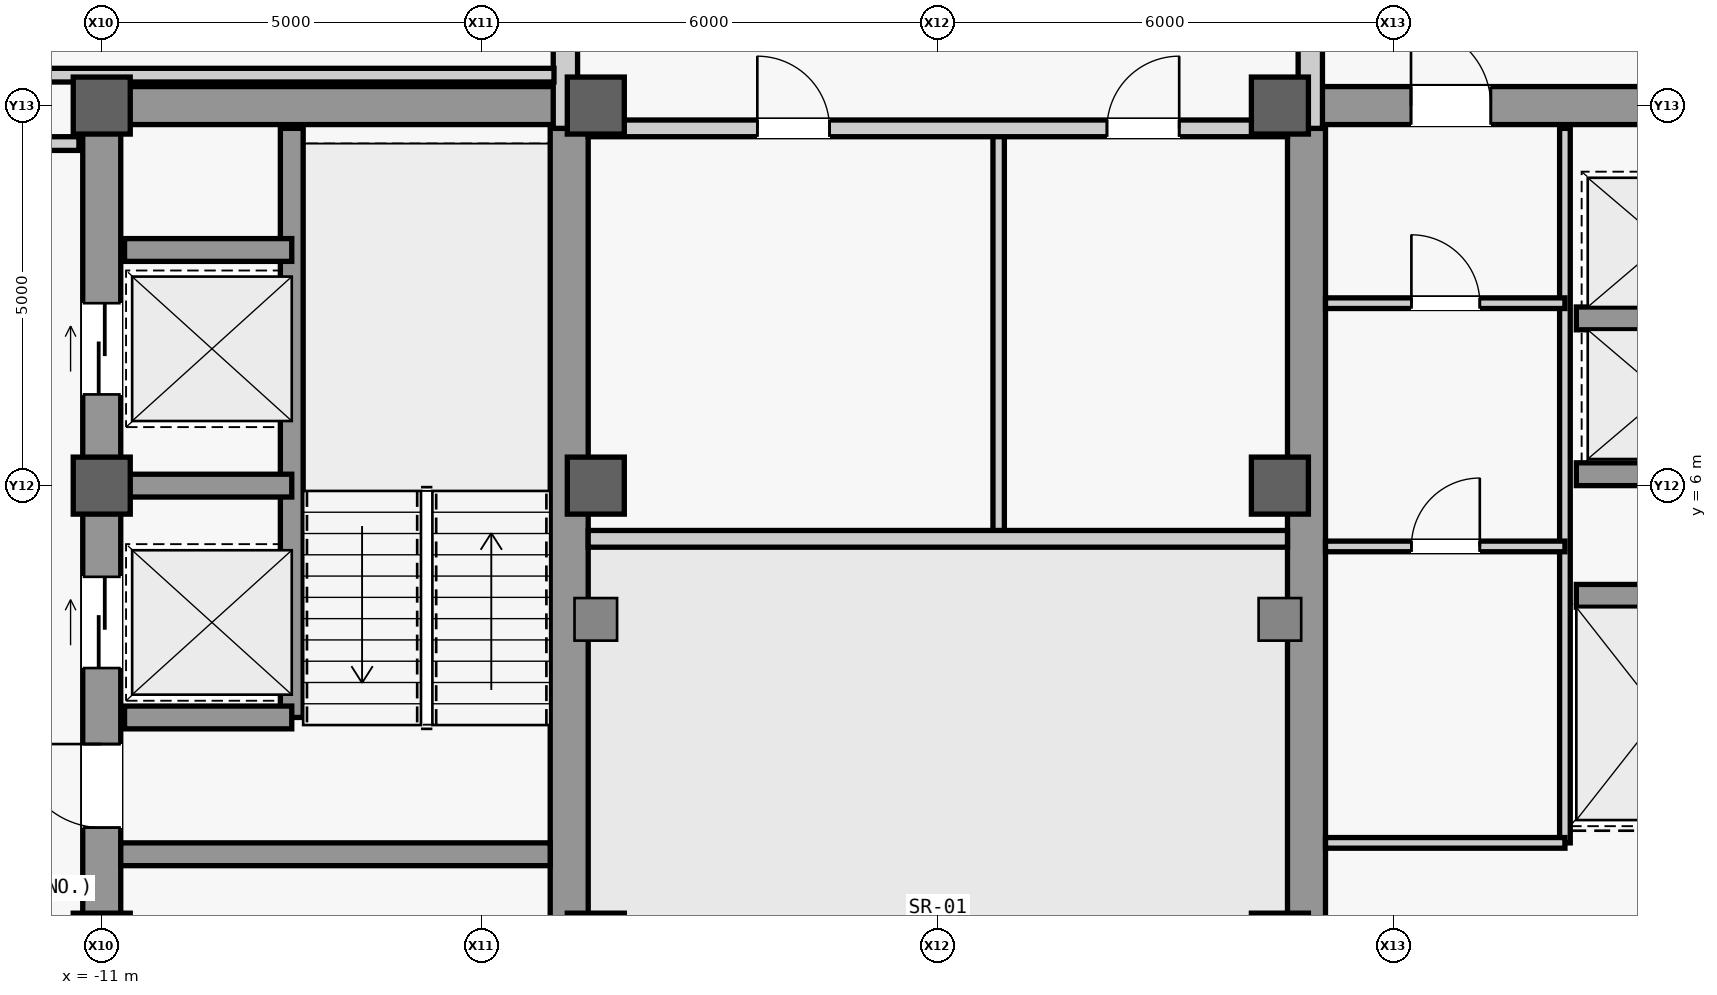
"""IFC4 building model, lengths in metres.
Left out: names, types, materials, properties, quantities, classifications, styles, units other than length and angle.
Written with IfcOpenShell. Run it as: python <this file> out.ifc"""

import sys

from ifc_helpers import new_model, si_unit, direction, frame, frame_2d, origin, origin_2d, place, context, subcontext, project, spatial, rectangle, extrude, source, transform, mapped, element, fill, save


model = new_model("IFC4")
c1 = context("Model", 3, precision=1e-05, world=origin(), true_north=direction((0.0, 1.0)))
c2 = subcontext(c1, "Body", "Model", "MODEL_VIEW")
j1 = project(units=[si_unit("LENGTHUNIT", "METRE"), si_unit("PLANEANGLEUNIT", "RADIAN")], contexts=[c1])
p1 = place(None, origin())
s1 = spatial("IfcSite", under=j1, at=p1, CompositionType="ELEMENT")
p2 = place(p1, origin())
s2 = spatial("IfcBuilding", under=s1, at=p2, CompositionType="ELEMENT")
p3 = place(p2, frame((0.0, 0.0, 346.3)))
s3 = spatial("IfcBuildingStorey", under=s2, at=p3, CompositionType="ELEMENT", Elevation=346.3)
m1 = source(origin(), c2, "Body", "SweptSolid", [
    extrude(rectangle(XDim=22.0, YDim=0.5, at=frame_2d((11.0, 0.0))), origin(), (0.0, 0.0, 1.0), 3.74),
])
p4 = place(p3, frame((-11.0, -11.0, 0.0), z_axis=(0.0, 0.0, 1.0), x_axis=(0.0, 1.0, 0.0)))
e1 = element("IfcWall", 1, at=p4, inside=s3, PredefinedType="SHEAR", context=c2, shape_type="MappedRepresentation", body=[
    mapped(m1, transform((0.0, 0.0, 0.0), scale=1.0)),
])
m2 = source(origin(), c2, "Body", "SweptSolid", [
    extrude(rectangle(XDim=1.1, YDim=2.2, at=frame_2d((0.55, 1.1))), frame((0.0, 0.26, 0.0), z_axis=(0.0, -1.0, 0.0), x_axis=(1.0, 0.0, 0.0)), (0.0, 0.0, 1.0), 0.52),
])
p5 = place(p4, frame((0.8, 0.0, 0.0)))
e2 = element("IfcOpeningElement", 2, at=p5, cuts=e1, PredefinedType="OPENING", context=c2, shape_type="MappedRepresentation", body=[
    mapped(m2, transform((0.0, 0.0, 0.0), scale=1.0)),
])
p6 = place(p4, frame((12.5, 0.0, 0.0)))
e3 = element("IfcOpeningElement", 3, at=p6, cuts=e1, PredefinedType="OPENING", context=c2, shape_type="MappedRepresentation", body=[
    mapped(m2, transform((0.0, 0.0, 0.0), scale=1.0)),
])
m3 = source(origin(), c2, "Body", "SweptSolid", [
    extrude(rectangle(XDim=0.9, YDim=2.15, at=frame_2d((0.45, 1.075))), frame((0.0, 0.26, 0.0), z_axis=(0.0, -1.0, 0.0), x_axis=(1.0, 0.0, 0.0)), (0.0, 0.0, 1.0), 0.52),
])
p7 = place(p4, frame((6.85, 0.0, 0.0)))
e4 = element("IfcOpeningElement", 4, at=p7, cuts=e1, PredefinedType="OPENING", context=c2, shape_type="MappedRepresentation", body=[
    mapped(m3, transform((0.0, 0.0, 0.0), scale=1.0)),
])
m4 = source(origin(), c2, "Body", "SweptSolid", [
    extrude(rectangle(XDim=1.2, YDim=2.3, at=frame_2d((0.6, 1.15))), frame((0.0, 0.26, 0.0), z_axis=(0.0, -1.0, 0.0), x_axis=(1.0, 0.0, 0.0)), (0.0, 0.0, 1.0), 0.52),
])
p8 = place(p4, frame((14.6, 0.0, 0.0)))
e5 = element("IfcOpeningElement", 5, at=p8, cuts=e1, PredefinedType="OPENING", context=c2, shape_type="MappedRepresentation", body=[
    mapped(m4, transform((0.0, 0.0, 0.0), scale=1.0)),
])
p9 = place(p4, frame((18.2, 0.0, 0.0)))
e6 = element("IfcOpeningElement", 6, at=p9, cuts=e1, PredefinedType="OPENING", context=c2, shape_type="MappedRepresentation", body=[
    mapped(m4, transform((0.0, 0.0, 0.0), scale=1.0)),
])
m5 = source(origin(), c2, "Body", "SweptSolid", [
    extrude(rectangle(XDim=1.3, YDim=2.3, at=frame_2d((0.65, 1.15))), frame((0.0, 0.26, 0.0), z_axis=(0.0, -1.0, 0.0), x_axis=(1.0, 0.0, 0.0)), (0.0, 0.0, 1.0), 0.52),
])
p10 = place(p4, frame((2.7, 0.0, 0.0)))
e7 = element("IfcOpeningElement", 7, at=p10, cuts=e1, PredefinedType="OPENING", context=c2, shape_type="MappedRepresentation", body=[
    mapped(m5, transform((0.0, 0.0, 0.0), scale=1.0)),
])
m6 = source(origin(), c2, "Body", "SweptSolid", [
    extrude(rectangle(XDim=21.4, YDim=0.5, at=frame_2d((10.7, 0.0))), origin(), (0.0, 0.0, 1.0), 3.74),
])
for number, where, z_axis, x_axis in (
    (8, (-4.85, -10.7, 0.0), (0.0, 0.0, 1.0), (0.0, 1.0, 0.0)),
    (9, (4.85, -10.7, 0.0), (0.0, 0.0, 1.0), (0.0, 1.0, 0.0)),
):
    element("IfcWall", number, at=place(p3, frame(where, z_axis=z_axis, x_axis=x_axis)), inside=s3, PredefinedType="SHEAR", context=c2, shape_type="MappedRepresentation", body=[
        mapped(m6, transform((0.0, 0.0, 0.0), scale=1.0)),
    ])
m7 = source(origin(), c2, "Body", "SweptSolid", [
    extrude(rectangle(XDim=5.9, YDim=0.5, at=frame_2d((2.95, 0.0))), origin(), (0.0, 0.0, 1.0), 3.74),
])
p11 = place(p3, frame((-10.75, 11.0, 0.0), z_axis=(0.0, 0.0, 1.0), x_axis=(1.0, 0.0, 0.0)))
e10 = element("IfcWall", 10, at=p11, inside=s3, PredefinedType="SHEAR", context=c2, shape_type="MappedRepresentation", body=[
    mapped(m7, transform((0.0, 0.0, 0.0), scale=1.0)),
])
p12 = place(p3, frame((4.85, 11.0, 0.0), z_axis=(0.0, 0.0, 1.0), x_axis=(1.0, 0.0, 0.0)))
e11 = element("IfcWall", 11, at=p12, inside=s3, PredefinedType="SHEAR", context=c2, shape_type="MappedRepresentation", body=[
    mapped(m7, transform((0.0, 0.0, 0.0), scale=1.0)),
])
m8 = source(origin(), c2, "Body", "SweptSolid", [
    extrude(rectangle(XDim=1.05, YDim=2.2, at=frame_2d((0.525, 1.1))), frame((0.0, 0.26, 0.0), z_axis=(0.0, -1.0, 0.0), x_axis=(1.0, 0.0, 0.0)), (0.0, 0.0, 1.0), 0.52),
])
p13 = place(p12, frame((1.375, 0.0, 0.0)))
e12 = element("IfcOpeningElement", 12, at=p13, cuts=e11, PredefinedType="OPENING", context=c2, shape_type="MappedRepresentation", body=[
    mapped(m8, transform((0.0, 0.0, 0.0), scale=1.0)),
])
m9 = source(origin(), c2, "Body", "SweptSolid", [
    extrude(rectangle(XDim=5.65, YDim=0.3, at=frame_2d((2.825, 0.0))), origin(), (0.0, 0.0, 1.0), 3.74),
])
p14 = place(p3, frame((-10.75, 1.15, 0.0), z_axis=(0.0, 0.0, 1.0), x_axis=(1.0, 0.0, 0.0)))
e13 = element("IfcWall", 13, at=p14, inside=s3, PredefinedType="SHEAR", context=c2, shape_type="MappedRepresentation", body=[
    mapped(m9, transform((0.0, 0.0, 0.0), scale=1.0)),
])
m10 = source(origin(), c2, "Body", "SweptSolid", [
    extrude(rectangle(XDim=0.75, YDim=0.75, at=origin_2d()), origin(), (0.0, 0.0, 1.0), 4.0),
])
for number, where, z_axis, x_axis in (
    (14, (-11.0, 0.0, 0.0), (0.0, 0.0, 1.0), (1.0, 0.0, 0.0)),
    (15, (-11.0, 6.0, 0.0), (0.0, 0.0, 1.0), (1.0, 0.0, 0.0)),
    (16, (-11.0, 11.0, 0.0), (0.0, 0.0, 1.0), (1.0, 0.0, 0.0)),
    (17, (-4.5, 0.0, 0.0), (0.0, 0.0, 1.0), (1.0, 0.0, 0.0)),
    (18, (-4.5, 6.0, 0.0), (0.0, 0.0, 1.0), (1.0, 0.0, 0.0)),
    (19, (-4.5, 11.0, 0.0), (0.0, 0.0, 1.0), (1.0, 0.0, 0.0)),
    (20, (4.5, 0.0, 0.0), (0.0, 0.0, 1.0), (1.0, 0.0, 0.0)),
    (21, (4.5, 6.0, 0.0), (0.0, 0.0, 1.0), (1.0, 0.0, 0.0)),
    (22, (4.5, 11.0, 0.0), (0.0, 0.0, 1.0), (1.0, 0.0, 0.0)),
):
    element("IfcColumn", number, at=place(p3, frame(where, z_axis=z_axis, x_axis=x_axis)), inside=s3, PredefinedType="COLUMN", context=c2, shape_type="MappedRepresentation", body=[
        mapped(m10, transform((0.0, 0.0, 0.0), scale=1.0)),
    ])
m11 = source(origin(), c2, "Body", "SweptSolid", [
    extrude(rectangle(XDim=14.98, YDim=0.32, at=frame_2d((7.49, 0.0))), origin(), (0.0, 0.0, 1.0), 3.045),
])
for number, where, z_axis, x_axis in (
    (23, (-4.9, 10.7, 0.0), (0.0, 0.0, 1.0), (0.0, 1.0, 0.0)),
    (24, (4.9, 10.7, 0.0), (0.0, 0.0, 1.0), (0.0, 1.0, 0.0)),
):
    element("IfcWall", number, at=place(p3, frame(where, z_axis=z_axis, x_axis=x_axis)), inside=s3, PredefinedType="STANDARD", context=c2, shape_type="MappedRepresentation", body=[
        mapped(m11, transform((0.0, 0.0, 0.0), scale=1.0)),
    ])
m12 = source(origin(), c2, "Body", "SweptSolid", [
    extrude(rectangle(XDim=7.75, YDim=0.3, at=frame_2d((3.875, 0.0))), origin(), (0.0, 0.0, 1.0), 3.74),
])
p15 = place(p3, frame((-8.5, 2.95, 0.0), z_axis=(0.0, 0.0, 1.0), x_axis=(0.0, 1.0, 0.0)))
e25 = element("IfcWall", 25, at=p15, inside=s3, PredefinedType="SHEAR", context=c2, shape_type="MappedRepresentation", body=[
    mapped(m12, transform((0.0, 0.0, 0.0), scale=1.0)),
])
m13 = source(origin(), c2, "Body", "SweptSolid", [
    extrude(rectangle(XDim=2.2, YDim=0.3, at=frame_2d((1.1, 0.0))), origin(), (0.0, 0.0, 1.0), 3.74),
])
for number, where, z_axis, x_axis in (
    (26, (-10.7, 2.95, 0.0), (0.0, 0.0, 1.0), (1.0, 0.0, 0.0)),
    (27, (-10.7, 6.0, 0.0), (0.0, 0.0, 1.0), (1.0, 0.0, 0.0)),
    (28, (-10.7, 9.1, 0.0), (0.0, 0.0, 1.0), (1.0, 0.0, 0.0)),
):
    element("IfcWall", number, at=place(p3, frame(where, z_axis=z_axis, x_axis=x_axis)), inside=s3, PredefinedType="SHEAR", context=c2, shape_type="MappedRepresentation", body=[
        mapped(m13, transform((0.0, 0.0, 0.0), scale=1.0)),
    ])
m14 = source(origin(), c2, "Body", "SweptSolid", [
    extrude(rectangle(XDim=2.3, YDim=0.3, at=frame_2d((1.15, 0.0))), origin(), (0.0, 0.0, 1.0), 3.74),
])
for number, where, z_axis, x_axis in (
    (29, (8.4, 4.55, 0.0), (0.0, 0.0, 1.0), (1.0, 0.0, 0.0)),
    (30, (8.4, 6.15, 0.0), (0.0, 0.0, 1.0), (1.0, 0.0, 0.0)),
    (31, (8.4, 8.2, 0.0), (0.0, 0.0, 1.0), (1.0, 0.0, 0.0)),
):
    element("IfcWall", number, at=place(p3, frame(where, z_axis=z_axis, x_axis=x_axis)), inside=s3, PredefinedType="SHEAR", context=c2, shape_type="MappedRepresentation", body=[
        mapped(m14, transform((0.0, 0.0, 0.0), scale=1.0)),
    ])
m15 = source(origin(), c2, "Body", "SweptSolid", [
    extrude(rectangle(XDim=9.4, YDim=0.14, at=frame_2d((4.7, 0.0))), origin(), (0.0, 0.0, 1.0), 3.74),
])
p16 = place(p3, frame((8.25, 1.3, 0.0), z_axis=(0.0, 0.0, 1.0), x_axis=(0.0, 1.0, 0.0)))
e32 = element("IfcWall", 32, at=p16, inside=s3, PredefinedType="PARTITIONING", context=c2, shape_type="MappedRepresentation", body=[
    mapped(m15, transform((0.0, 0.0, 0.0), scale=1.0)),
])
m16 = source(origin(), c2, "Body", "SweptSolid", [
    extrude(rectangle(XDim=3.15, YDim=0.14, at=frame_2d((1.575, 0.0))), origin(), (0.0, 0.0, 1.0), 3.74),
])
p17 = place(p3, frame((5.1, 1.3, 0.0), z_axis=(0.0, 0.0, 1.0), x_axis=(1.0, 0.0, 0.0)))
e33 = element("IfcWall", 33, at=p17, inside=s3, PredefinedType="PARTITIONING", context=c2, shape_type="MappedRepresentation", body=[
    mapped(m16, transform((0.0, 0.0, 0.0), scale=1.0)),
])
p18 = place(p3, frame((5.1, 8.4, 0.0), z_axis=(0.0, 0.0, 1.0), x_axis=(1.0, 0.0, 0.0)))
e34 = element("IfcWall", 34, at=p18, inside=s3, PredefinedType="PARTITIONING", context=c2, shape_type="MappedRepresentation", body=[
    mapped(m16, transform((0.0, 0.0, 0.0), scale=1.0)),
])
m17 = source(origin(), c2, "Body", "SweptSolid", [
    extrude(rectangle(XDim=0.9, YDim=2.15, at=frame_2d((0.45, 1.075))), frame((0.0, 0.08, 0.0), z_axis=(0.0, -1.0, 0.0), x_axis=(1.0, 0.0, 0.0)), (0.0, 0.0, 1.0), 0.16),
])
p19 = place(p18, frame((1.13, 0.0, 0.0)))
e35 = element("IfcOpeningElement", 35, at=p19, cuts=e34, PredefinedType="OPENING", context=c2, shape_type="MappedRepresentation", body=[
    mapped(m17, transform((0.0, 0.0, 0.0), scale=1.0)),
])
p20 = place(p3, frame((5.1, 5.2, 0.0), z_axis=(0.0, 0.0, 1.0), x_axis=(1.0, 0.0, 0.0)))
e36 = element("IfcWall", 36, at=p20, inside=s3, PredefinedType="PARTITIONING", context=c2, shape_type="MappedRepresentation", body=[
    mapped(m16, transform((0.0, 0.0, 0.0), scale=1.0)),
])
p21 = place(p20, frame((1.13, 0.0, 0.0)))
e37 = element("IfcOpeningElement", 37, at=p21, cuts=e36, PredefinedType="OPENING", context=c2, shape_type="MappedRepresentation", body=[
    mapped(m17, transform((0.0, 0.0, 0.0), scale=1.0)),
])
m18 = source(origin(), c2, "Body", "SweptSolid", [
    extrude(rectangle(XDim=4.05, YDim=0.18, at=frame_2d((2.025, 0.0))), origin(), (0.0, 0.0, 1.0), 3.74),
])
p22 = place(p3, frame((-15.35, 10.5, 0.0), z_axis=(0.0, 0.0, 1.0), x_axis=(1.0, 0.0, 0.0)))
e38 = element("IfcWall", 38, at=p22, inside=s3, PredefinedType="PARTITIONING", context=c2, shape_type="MappedRepresentation", body=[
    mapped(m18, transform((0.0, 0.0, 0.0), scale=1.0)),
])
m19 = source(origin(), c2, "Body", "SweptSolid", [
    extrude(rectangle(XDim=5.4, YDim=0.15, at=frame_2d((2.7, 0.0))), origin(), (0.0, 0.0, 1.0), 3.74),
])
p23 = place(p3, frame((0.8, 5.3, 0.0), z_axis=(0.0, 0.0, 1.0), x_axis=(0.0, 1.0, 0.0)))
e39 = element("IfcWall", 39, at=p23, inside=s3, PredefinedType="PARTITIONING", context=c2, shape_type="MappedRepresentation", body=[
    mapped(m19, transform((0.0, 0.0, 0.0), scale=1.0)),
])
m20 = source(origin(), c2, "Body", "SweptSolid", [
    extrude(rectangle(XDim=9.2, YDim=0.22, at=frame_2d((4.6, 0.0))), origin(), (0.0, 0.0, 1.0), 3.74),
])
p24 = place(p3, frame((-4.6, 5.3, 0.0), z_axis=(0.0, 0.0, 1.0), x_axis=(1.0, 0.0, 0.0)))
e40 = element("IfcWall", 40, at=p24, inside=s3, PredefinedType="PARTITIONING", context=c2, shape_type="MappedRepresentation", body=[
    mapped(m20, transform((0.0, 0.0, 0.0), scale=1.0)),
])
p25 = place(p3, frame((-4.6, 10.7, 0.0), z_axis=(0.0, 0.0, 1.0), x_axis=(1.0, 0.0, 0.0)))
e41 = element("IfcWall", 41, at=p25, inside=s3, PredefinedType="PARTITIONING", context=c2, shape_type="MappedRepresentation", body=[
    mapped(m20, transform((0.0, 0.0, 0.0), scale=1.0)),
])
m21 = source(origin(), c2, "Body", "SweptSolid", [
    extrude(rectangle(XDim=0.95, YDim=2.15, at=frame_2d((0.475, 1.075))), frame((0.0, 0.12, 0.0), z_axis=(0.0, -1.0, 0.0), x_axis=(1.0, 0.0, 0.0)), (0.0, 0.0, 1.0), 0.24),
])
p26 = place(p25, frame((2.225, 0.0, 0.0)))
e42 = element("IfcOpeningElement", 42, at=p26, cuts=e41, PredefinedType="OPENING", context=c2, shape_type="MappedRepresentation", body=[
    mapped(m21, transform((0.0, 0.0, 0.0), scale=1.0)),
])
p27 = place(p25, frame((6.825, 0.0, 0.0)))
e43 = element("IfcOpeningElement", 43, at=p27, cuts=e41, PredefinedType="OPENING", context=c2, shape_type="MappedRepresentation", body=[
    mapped(m21, transform((0.0, 0.0, 0.0), scale=1.0)),
])
m22 = source(origin(), c2, "Body", "SweptSolid", [
    extrude(rectangle(XDim=12.7, YDim=0.18, at=frame_2d((6.35, 0.0))), origin(), (0.0, 0.0, 1.0), 2.79),
])
p28 = place(p3, frame((-17.75, 11.4, 0.0), z_axis=(0.0, 0.0, 1.0), x_axis=(1.0, 0.0, 0.0)))
e44 = element("IfcWall", 44, at=p28, inside=s3, PredefinedType="PARTITIONING", context=c2, shape_type="MappedRepresentation", body=[
    mapped(m22, transform((0.0, 0.0, 0.0), scale=1.0)),
])
m23 = source(origin(), c2, "Body", "SweptSolid", [
    extrude(rectangle(XDim=1.05, YDim=2.2, at=frame_2d((0.525, 1.1))), frame((0.0, 0.1, 0.0), z_axis=(0.0, -1.0, 0.0), x_axis=(1.0, 0.0, 0.0)), (0.0, 0.0, 1.0), 0.2),
])
p29 = place(p28, frame((0.675, 0.0, 0.0)))
e45 = element("IfcOpeningElement", 45, at=p29, cuts=e44, PredefinedType="OPENING", context=c2, shape_type="MappedRepresentation", body=[
    mapped(m23, transform((0.0, 0.0, 0.0), scale=1.0)),
])
m24 = source(origin(), c2, "Body", "SweptSolid", [
    extrude(rectangle(XDim=1.1, YDim=2.2, at=frame_2d((0.55, 1.1))), frame((0.0, 0.025, 0.0), z_axis=(0.0, -1.0, 0.0), x_axis=(1.0, 0.0, 0.0)), (0.0, 0.0, 1.0), 0.05),
])
p30 = place(p6, origin())
e46 = element("IfcDoor", 46, at=p30, inside=s3, OperationType="SINGLE_SWING_RIGHT", PredefinedType="DOOR", context=c2, shape_type="MappedRepresentation", body=[
    mapped(m24, transform((0.0, 0.0, 0.0), scale=1.0)),
])
fill(e3, e46)
m25 = source(origin(), c2, "Body", "SweptSolid", [
    extrude(rectangle(XDim=1.05, YDim=2.2, at=frame_2d((0.525, 1.1))), frame((0.0, 0.025, 0.0), z_axis=(0.0, -1.0, 0.0), x_axis=(1.0, 0.0, 0.0)), (0.0, 0.0, 1.0), 0.05),
])
p31 = place(p13, origin())
e47 = element("IfcDoor", 47, at=p31, inside=s3, OperationType="SINGLE_SWING_LEFT", PredefinedType="DOOR", context=c2, shape_type="MappedRepresentation", body=[
    mapped(m25, transform((0.0, 0.0, 0.0), scale=1.0)),
])
fill(e12, e47)
m26 = source(origin(), c2, "Body", "SweptSolid", [
    extrude(rectangle(XDim=0.9, YDim=2.15, at=frame_2d((0.45, 1.075))), frame((0.0, 0.025, 0.0), z_axis=(0.0, -1.0, 0.0), x_axis=(1.0, 0.0, 0.0)), (0.0, 0.0, 1.0), 0.05),
])
p32 = place(p19, origin())
e48 = element("IfcDoor", 48, at=p32, inside=s3, OperationType="SINGLE_SWING_LEFT", PredefinedType="DOOR", context=c2, shape_type="MappedRepresentation", body=[
    mapped(m26, transform((0.0, 0.0, 0.0), scale=1.0)),
])
fill(e35, e48)
p33 = place(p21, origin())
e49 = element("IfcDoor", 49, at=p33, inside=s3, OperationType="SINGLE_SWING_RIGHT", PredefinedType="DOOR", context=c2, shape_type="MappedRepresentation", body=[
    mapped(m26, transform((0.0, 0.0, 0.0), scale=1.0)),
])
fill(e37, e49)
m27 = source(origin(), c2, "Body", "SweptSolid", [
    extrude(rectangle(XDim=0.95, YDim=2.15, at=frame_2d((0.475, 1.075))), frame((0.0, 0.025, 0.0), z_axis=(0.0, -1.0, 0.0), x_axis=(1.0, 0.0, 0.0)), (0.0, 0.0, 1.0), 0.05),
])
p34 = place(p26, origin())
e50 = element("IfcDoor", 50, at=p34, inside=s3, OperationType="SINGLE_SWING_LEFT", PredefinedType="DOOR", context=c2, shape_type="MappedRepresentation", body=[
    mapped(m27, transform((0.0, 0.0, 0.0), scale=1.0)),
])
fill(e42, e50)
p35 = place(p27, origin())
e51 = element("IfcDoor", 51, at=p35, inside=s3, OperationType="SINGLE_SWING_RIGHT", PredefinedType="DOOR", context=c2, shape_type="MappedRepresentation", body=[
    mapped(m27, transform((0.0, 0.0, 0.0), scale=1.0)),
])
fill(e43, e51)
m28 = source(origin(), c2, "Body", "SweptSolid", [
    extrude(rectangle(XDim=1.2, YDim=2.3, at=frame_2d((0.6, 1.15))), frame((0.0, 0.025, 0.0), z_axis=(0.0, -1.0, 0.0), x_axis=(1.0, 0.0, 0.0)), (0.0, 0.0, 1.0), 0.05),
])
p36 = place(p8, origin())
e52 = element("IfcDoor", 52, at=p36, inside=s3, OperationType="SLIDING_TO_LEFT", PredefinedType="DOOR", context=c2, shape_type="MappedRepresentation", body=[
    mapped(m28, transform((0.0, 0.0, 0.0), scale=1.0)),
])
fill(e5, e52)
p37 = place(p9, origin())
e53 = element("IfcDoor", 53, at=p37, inside=s3, OperationType="SLIDING_TO_LEFT", PredefinedType="DOOR", context=c2, shape_type="MappedRepresentation", body=[
    mapped(m28, transform((0.0, 0.0, 0.0), scale=1.0)),
])
fill(e6, e53)
save(model, sys.argv[1])
